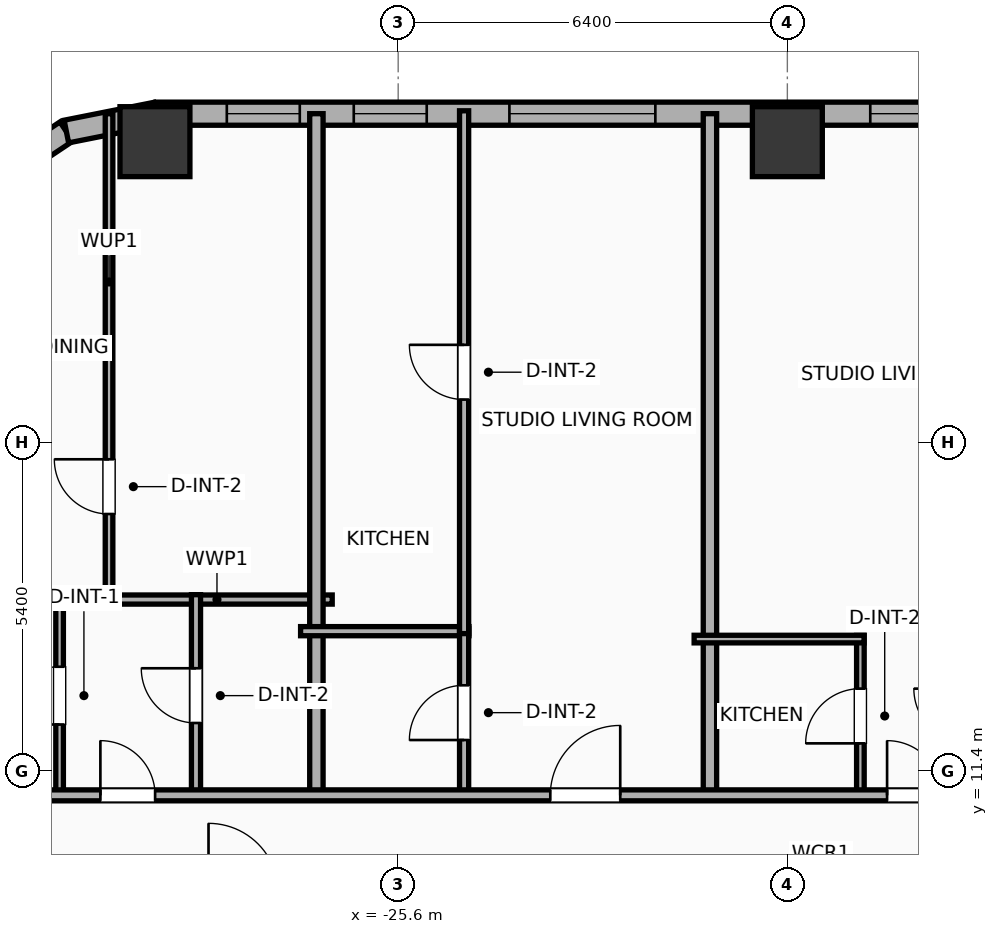
"""IFC4 building model, lengths in metres.
Left out: names, types, materials, properties, quantities, classifications, styles, units other than length and angle.
Written with IfcOpenShell. Run it as: python <this file> out.ifc"""

import sys

from ifc_helpers import new_model, si_unit, direction, frame, frame_2d, origin, origin_2d, place, context, subcontext, project, spatial, rectangle, hollow_rectangle, extrude, element, fill, save


model = new_model("IFC4")
c1 = context("Model", 3, precision=1e-05, world=origin(), true_north=direction((0.0, 1.0)))
c2 = subcontext(c1, "Body", "Model", "MODEL_VIEW")
j1 = project(units=[si_unit("LENGTHUNIT", "METRE"), si_unit("PLANEANGLEUNIT", "RADIAN")], contexts=[c1])
p1 = place(None, origin())
s1 = spatial("IfcSite", under=j1, at=p1, CompositionType="ELEMENT")
p2 = place(p1, origin())
s2 = spatial("IfcBuilding", under=s1, at=p2, CompositionType="ELEMENT")
p3 = place(p2, frame((0.0, 0.0, 65.0)))
s3 = spatial("IfcBuildingStorey", under=s2, at=p3, CompositionType="ELEMENT", Elevation=65.0)
for number, where, z_axis, x_axis in (
    (1, (-19.2, 21.75, 0.0), (0.0, 0.0, 1.0), (1.0, 0.0, 0.0)),
    (2, (-29.6, 21.75, 0.0), (0.0, 0.0, 1.0), (1.0, 0.0, 0.0)),
):
    element("IfcColumn", number, at=place(p3, frame(where, z_axis=z_axis, x_axis=x_axis)), inside=s3, PredefinedType="COLUMN", context=c2, shape_type="SweptSolid", body=[
        extrude(hollow_rectangle(XDim=1.15, YDim=1.15, WallThickness=0.04, at=origin_2d()), origin(), (0.0, 0.0, 1.0), 3.9),
    ])
p4 = place(p3, frame((-32.292, 21.091, 0.0), z_axis=(0.0, 0.0, 1.0), x_axis=(0.831442848281, 0.555610286119, 0.0)))
e3 = element("IfcWall", 3, at=p4, inside=s3, PredefinedType="ELEMENTEDWALL", context=c2, shape_type="SweptSolid", body=[
    extrude(rectangle(XDim=1.485, YDim=0.38, at=frame_2d((0.743, 0.0))), origin(), (0.0, 0.0, 1.0), 3.65),
])
p5 = place(p3, frame((-31.057, 21.917, 0.0), z_axis=(0.0, 0.0, 1.0), x_axis=(0.980786132421, 0.195086038585, 0.0)))
e4 = element("IfcWall", 4, at=p5, inside=s3, PredefinedType="ELEMENTEDWALL", context=c2, shape_type="SweptSolid", body=[
    extrude(rectangle(XDim=1.504, YDim=0.38, at=frame_2d((0.752, 0.0))), origin(), (0.0, 0.0, 1.0), 3.65),
])
p6 = place(p3, frame((-29.581, 22.21, 0.0), z_axis=(0.0, 0.0, 1.0), x_axis=(1.0, 0.0, 0.0)))
e5 = element("IfcWall", 5, at=p6, inside=s3, PredefinedType="ELEMENTEDWALL", context=c2, shape_type="SweptSolid", body=[
    extrude(rectangle(XDim=51.963, YDim=0.38, at=frame_2d((25.981, 0.0))), origin(), (0.0, 0.0, 1.0), 3.65),
])
p7 = place(p6, frame((5.81, 0.0, 0.75)))
e6 = element("IfcOpeningElement", 6, at=p7, cuts=e5, PredefinedType="OPENING", context=c2, shape_type="SweptSolid", body=[
    extrude(rectangle(XDim=2.4, YDim=2.1, at=frame_2d((1.2, 1.05))), frame((0.0, 0.2, 0.0), z_axis=(0.0, -1.0, 0.0), x_axis=(1.0, 0.0, 0.0)), (0.0, 0.0, 1.0), 0.4),
])
p8 = place(p6, frame((26.431, 0.0, 0.75)))
e7 = element("IfcOpeningElement", 7, at=p8, cuts=e5, PredefinedType="OPENING", context=c2, shape_type="SweptSolid", body=[
    extrude(rectangle(XDim=2.4, YDim=2.1, at=frame_2d((1.2, 1.05))), frame((0.0, 0.2, 0.0), z_axis=(0.0, -1.0, 0.0), x_axis=(1.0, 0.0, 0.0)), (0.0, 0.0, 1.0), 0.4),
])
p9 = place(p6, frame((43.752, 0.0, 0.75)))
e8 = element("IfcOpeningElement", 8, at=p9, cuts=e5, PredefinedType="OPENING", context=c2, shape_type="SweptSolid", body=[
    extrude(rectangle(XDim=2.4, YDim=2.1, at=frame_2d((1.2, 1.05))), frame((0.0, 0.2, 0.0), z_axis=(0.0, -1.0, 0.0), x_axis=(1.0, 0.0, 0.0)), (0.0, 0.0, 1.0), 0.4),
])
p10 = place(p6, frame((1.163, 0.0, 0.75)))
e9 = element("IfcOpeningElement", 9, at=p10, cuts=e5, PredefinedType="OPENING", context=c2, shape_type="SweptSolid", body=[
    extrude(rectangle(XDim=1.2, YDim=2.05, at=frame_2d((0.6, 1.025))), frame((0.0, 0.2, 0.0), z_axis=(0.0, -1.0, 0.0), x_axis=(1.0, 0.0, 0.0)), (0.0, 0.0, 1.0), 0.4),
])
p11 = place(p6, frame((3.251, 0.0, 0.75)))
e10 = element("IfcOpeningElement", 10, at=p11, cuts=e5, PredefinedType="OPENING", context=c2, shape_type="SweptSolid", body=[
    extrude(rectangle(XDim=1.2, YDim=2.05, at=frame_2d((0.6, 1.025))), frame((0.0, 0.2, 0.0), z_axis=(0.0, -1.0, 0.0), x_axis=(1.0, 0.0, 0.0)), (0.0, 0.0, 1.0), 0.4),
])
p12 = place(p6, frame((11.745, 0.0, 0.75)))
e11 = element("IfcOpeningElement", 11, at=p12, cuts=e5, PredefinedType="OPENING", context=c2, shape_type="SweptSolid", body=[
    extrude(rectangle(XDim=1.2, YDim=2.05, at=frame_2d((0.6, 1.025))), frame((0.0, 0.2, 0.0), z_axis=(0.0, -1.0, 0.0), x_axis=(1.0, 0.0, 0.0)), (0.0, 0.0, 1.0), 0.4),
])
p13 = place(p6, frame((16.776, 0.0, 0.75)))
e12 = element("IfcOpeningElement", 12, at=p13, cuts=e5, PredefinedType="OPENING", context=c2, shape_type="SweptSolid", body=[
    extrude(rectangle(XDim=1.2, YDim=2.05, at=frame_2d((0.6, 1.025))), frame((0.0, 0.2, 0.0), z_axis=(0.0, -1.0, 0.0), x_axis=(1.0, 0.0, 0.0)), (0.0, 0.0, 1.0), 0.4),
])
p14 = place(p6, frame((21.531, 0.0, 0.75)))
e13 = element("IfcOpeningElement", 13, at=p14, cuts=e5, PredefinedType="OPENING", context=c2, shape_type="SweptSolid", body=[
    extrude(rectangle(XDim=0.85, YDim=2.05, at=frame_2d((0.425, 1.025))), frame((0.0, 0.2, 0.0), z_axis=(0.0, -1.0, 0.0), x_axis=(1.0, 0.0, 0.0)), (0.0, 0.0, 1.0), 0.4),
])
p15 = place(p6, frame((23.776, 0.0, 0.75)))
e14 = element("IfcOpeningElement", 14, at=p15, cuts=e5, PredefinedType="OPENING", context=c2, shape_type="SweptSolid", body=[
    extrude(rectangle(XDim=1.2, YDim=2.05, at=frame_2d((0.6, 1.025))), frame((0.0, 0.2, 0.0), z_axis=(0.0, -1.0, 0.0), x_axis=(1.0, 0.0, 0.0)), (0.0, 0.0, 1.0), 0.4),
])
p16 = place(p6, frame((32.031, 0.0, 0.75)))
e15 = element("IfcOpeningElement", 15, at=p16, cuts=e5, PredefinedType="OPENING", context=c2, shape_type="SweptSolid", body=[
    extrude(rectangle(XDim=0.85, YDim=2.05, at=frame_2d((0.425, 1.025))), frame((0.0, 0.2, 0.0), z_axis=(0.0, -1.0, 0.0), x_axis=(1.0, 0.0, 0.0)), (0.0, 0.0, 1.0), 0.4),
])
p17 = place(p6, frame((34.276, 0.0, 0.75)))
e16 = element("IfcOpeningElement", 16, at=p17, cuts=e5, PredefinedType="OPENING", context=c2, shape_type="SweptSolid", body=[
    extrude(rectangle(XDim=1.2, YDim=2.05, at=frame_2d((0.6, 1.025))), frame((0.0, 0.2, 0.0), z_axis=(0.0, -1.0, 0.0), x_axis=(1.0, 0.0, 0.0)), (0.0, 0.0, 1.0), 0.4),
])
p18 = place(p6, frame((37.776, 0.0, 0.75)))
e17 = element("IfcOpeningElement", 17, at=p18, cuts=e5, PredefinedType="OPENING", context=c2, shape_type="SweptSolid", body=[
    extrude(rectangle(XDim=1.2, YDim=2.05, at=frame_2d((0.6, 1.025))), frame((0.0, 0.2, 0.0), z_axis=(0.0, -1.0, 0.0), x_axis=(1.0, 0.0, 0.0)), (0.0, 0.0, 1.0), 0.4),
])
p19 = place(p6, frame((42.411, 0.0, 0.75)))
e18 = element("IfcOpeningElement", 18, at=p19, cuts=e5, PredefinedType="OPENING", context=c2, shape_type="SweptSolid", body=[
    extrude(rectangle(XDim=0.85, YDim=2.05, at=frame_2d((0.425, 1.025))), frame((0.0, 0.2, 0.0), z_axis=(0.0, -1.0, 0.0), x_axis=(1.0, 0.0, 0.0)), (0.0, 0.0, 1.0), 0.4),
])
p20 = place(p6, frame((47.791, 0.0, 0.75)))
e19 = element("IfcOpeningElement", 19, at=p20, cuts=e5, PredefinedType="OPENING", context=c2, shape_type="SweptSolid", body=[
    extrude(rectangle(XDim=1.2, YDim=2.05, at=frame_2d((0.6, 1.025))), frame((0.0, 0.2, 0.0), z_axis=(0.0, -1.0, 0.0), x_axis=(1.0, 0.0, 0.0)), (0.0, 0.0, 1.0), 0.4),
])
p21 = place(p6, frame((49.901, 0.0, 0.75)))
e20 = element("IfcOpeningElement", 20, at=p21, cuts=e5, PredefinedType="OPENING", context=c2, shape_type="SweptSolid", body=[
    extrude(rectangle(XDim=1.2, YDim=2.05, at=frame_2d((0.6, 1.025))), frame((0.0, 0.2, 0.0), z_axis=(0.0, -1.0, 0.0), x_axis=(1.0, 0.0, 0.0)), (0.0, 0.0, 1.0), 0.4),
])
p22 = place(p3, frame((-30.355, 14.14, 0.0), z_axis=(0.0, 0.0, 1.0), x_axis=(0.0, 1.0, 0.0)))
e21 = element("IfcWall", 21, at=p22, inside=s3, PredefinedType="PARTITIONING", context=c2, shape_type="SweptSolid", body=[
    extrude(rectangle(XDim=8.069, YDim=0.125, at=frame_2d((4.035, 0.0))), origin(), (0.0, 0.0, 1.0), 3.65),
])
p23 = place(p22, frame((1.487, 0.0, 0.0)))
e22 = element("IfcOpeningElement", 22, at=p23, cuts=e21, PredefinedType="OPENING", context=c2, shape_type="SweptSolid", body=[
    extrude(rectangle(XDim=0.9, YDim=2.05, at=frame_2d((0.45, 1.025))), frame((0.0, 0.073, 0.0), z_axis=(0.0, -1.0, 0.0), x_axis=(1.0, 0.0, 0.0)), (0.0, 0.0, 1.0), 0.145),
])
p24 = place(p3, frame((-30.475, 14.22, 0.0), z_axis=(0.0, 0.0, 1.0), x_axis=(1.0, 0.0, 0.0)))
e23 = element("IfcWall", 23, at=p24, inside=s3, PredefinedType="PLUMBINGWALL", context=c2, shape_type="SweptSolid", body=[
    extrude(rectangle(XDim=3.79, YDim=0.15, at=frame_2d((1.895, 0.0))), origin(), (0.0, 0.0, 1.0), 3.65),
])
p25 = place(p3, frame((-31.168, 10.98, 0.0), z_axis=(0.0, 0.0, 1.0), x_axis=(0.0, 1.0, 0.0)))
e24 = element("IfcWall", 24, at=p25, inside=s3, PredefinedType="PARTITIONING", context=c2, shape_type="SweptSolid", body=[
    extrude(rectangle(XDim=3.32, YDim=0.125, at=frame_2d((1.66, 0.0))), origin(), (0.0, 0.0, 1.0), 3.65),
])
p26 = place(p25, frame((1.185, 0.0, 0.0)))
e25 = element("IfcOpeningElement", 25, at=p26, cuts=e24, PredefinedType="OPENING", context=c2, shape_type="SweptSolid", body=[
    extrude(rectangle(XDim=0.95, YDim=2.05, at=frame_2d((0.475, 1.025))), frame((0.0, 0.073, 0.0), z_axis=(0.0, -1.0, 0.0), x_axis=(1.0, 0.0, 0.0)), (0.0, 0.0, 1.0), 0.145),
])
p27 = place(p3, frame((-33.56, 14.22, 0.0), z_axis=(0.0, 0.0, 1.0), x_axis=(1.0, 0.0, 0.0)))
e26 = element("IfcWall", 26, at=p27, inside=s3, PredefinedType="PARTITIONING", context=c2, shape_type="SweptSolid", body=[
    extrude(rectangle(XDim=2.512, YDim=0.125, at=frame_2d((1.256, 0.0))), origin(), (0.0, 0.0, 1.0), 3.65),
])
p28 = place(p3, frame((-28.925, 10.98, 0.0), z_axis=(0.0, 0.0, 1.0), x_axis=(0.0, 1.0, 0.0)))
e27 = element("IfcWall", 27, at=p28, inside=s3, PredefinedType="PLUMBINGWALL", context=c2, shape_type="SweptSolid", body=[
    extrude(rectangle(XDim=3.32, YDim=0.15, at=frame_2d((1.66, 0.0))), origin(), (0.0, 0.0, 1.0), 3.65),
])
p29 = place(p28, frame((1.21, 0.0, 0.0)))
e28 = element("IfcOpeningElement", 28, at=p29, cuts=e27, PredefinedType="OPENING", context=c2, shape_type="SweptSolid", body=[
    extrude(rectangle(XDim=0.9, YDim=2.05, at=frame_2d((0.45, 1.025))), frame((0.0, 0.085, 0.0), z_axis=(0.0, -1.0, 0.0), x_axis=(1.0, 0.0, 0.0)), (0.0, 0.0, 1.0), 0.17),
])
p30 = place(p3, frame((-26.945, 10.92, 0.0), z_axis=(0.0, 0.0, 1.0), x_axis=(0.0, 1.0, 0.0)))
e29 = element("IfcWall", 29, at=p30, inside=s3, PredefinedType="PARTITIONING", context=c2, shape_type="SweptSolid", body=[
    extrude(rectangle(XDim=11.29, YDim=0.22, at=frame_2d((5.645, 0.0))), origin(), (0.0, 0.0, 1.0), 3.65),
])
p31 = place(p3, frame((-27.205, 13.7, 0.0), z_axis=(0.0, 0.0, 1.0), x_axis=(1.0, 0.0, 0.0)))
e30 = element("IfcWall", 30, at=p31, inside=s3, PredefinedType="PLUMBINGWALL", context=c2, shape_type="SweptSolid", body=[
    extrude(rectangle(XDim=2.769, YDim=0.15, at=frame_2d((1.385, 0.0))), origin(), (0.0, 0.0, 1.0), 3.65),
])
p32 = place(p3, frame((-24.516, 10.98, 0.0), z_axis=(0.0, 0.0, 1.0), x_axis=(0.0, 1.0, 0.0)))
e31 = element("IfcWall", 31, at=p32, inside=s3, PredefinedType="PLUMBINGWALL", context=c2, shape_type="SweptSolid", body=[
    extrude(rectangle(XDim=2.76, YDim=0.15, at=frame_2d((1.38, 0.0))), origin(), (0.0, 0.0, 1.0), 3.65),
])
p33 = place(p32, frame((0.93, 0.0, 0.0)))
e32 = element("IfcOpeningElement", 32, at=p33, cuts=e31, PredefinedType="OPENING", context=c2, shape_type="SweptSolid", body=[
    extrude(rectangle(XDim=0.9, YDim=2.05, at=frame_2d((0.45, 1.025))), frame((0.0, 0.085, 0.0), z_axis=(0.0, -1.0, 0.0), x_axis=(1.0, 0.0, 0.0)), (0.0, 0.0, 1.0), 0.17),
])
p34 = place(p3, frame((-24.516, 13.66, 0.0), z_axis=(0.0, 0.0, 1.0), x_axis=(0.0, 1.0, 0.0)))
e33 = element("IfcWall", 33, at=p34, inside=s3, PredefinedType="PLUMBINGWALL", context=c2, shape_type="SweptSolid", body=[
    extrude(rectangle(XDim=8.598, YDim=0.15, at=frame_2d((4.299, 0.0))), origin(), (0.0, 0.0, 1.0), 3.65),
])
p35 = place(p34, frame((3.849, 0.0, 0.0)))
e34 = element("IfcOpeningElement", 34, at=p35, cuts=e33, PredefinedType="OPENING", context=c2, shape_type="SweptSolid", body=[
    extrude(rectangle(XDim=0.9, YDim=2.05, at=frame_2d((0.45, 1.025))), frame((0.0, 0.085, 0.0), z_axis=(0.0, -1.0, 0.0), x_axis=(1.0, 0.0, 0.0)), (0.0, 0.0, 1.0), 0.17),
])
p36 = place(p3, frame((-20.473, 10.92, 0.0), z_axis=(0.0, 0.0, 1.0), x_axis=(0.0, 1.0, 0.0)))
e35 = element("IfcWall", 35, at=p36, inside=s3, PredefinedType="PARTITIONING", context=c2, shape_type="SweptSolid", body=[
    extrude(rectangle(XDim=11.29, YDim=0.22, at=frame_2d((5.645, 0.0))), origin(), (0.0, 0.0, 1.0), 3.65),
])
p37 = place(p3, frame((-17.999, 10.98, 0.0), z_axis=(0.0, 0.0, 1.0), x_axis=(0.0, 1.0, 0.0)))
e36 = element("IfcWall", 36, at=p37, inside=s3, PredefinedType="PARTITIONING", context=c2, shape_type="SweptSolid", body=[
    extrude(rectangle(XDim=2.65, YDim=0.125, at=frame_2d((1.325, 0.0))), origin(), (0.0, 0.0, 1.0), 3.65),
])
p38 = place(p37, frame((0.875, 0.0, 0.0)))
e37 = element("IfcOpeningElement", 37, at=p38, cuts=e36, PredefinedType="OPENING", context=c2, shape_type="SweptSolid", body=[
    extrude(rectangle(XDim=0.9, YDim=2.05, at=frame_2d((0.45, 1.025))), frame((0.0, 0.073, 0.0), z_axis=(0.0, -1.0, 0.0), x_axis=(1.0, 0.0, 0.0)), (0.0, 0.0, 1.0), 0.145),
])
p39 = place(p3, frame((-20.733, 13.57, 0.0), z_axis=(0.0, 0.0, 1.0), x_axis=(1.0, 0.0, 0.0)))
e38 = element("IfcWall", 38, at=p39, inside=s3, PredefinedType="PARTITIONING", context=c2, shape_type="SweptSolid", body=[
    extrude(rectangle(XDim=2.794, YDim=0.125, at=frame_2d((1.397, 0.0))), origin(), (0.0, 0.0, 1.0), 3.65),
])
p40 = place(p3, frame((-33.41, 11.0, 0.0), z_axis=(0.0, 0.0, 1.0), x_axis=(1.0, 0.0, 0.0)))
e39 = element("IfcWall", 39, at=p40, inside=s3, PredefinedType="PARTITIONING", context=c2, shape_type="SweptSolid", body=[
    extrude(rectangle(XDim=59.62, YDim=0.18, at=frame_2d((29.81, 0.0))), origin(), (0.0, 0.0, 1.0), 3.65),
])
p41 = place(p40, frame((2.913, 0.0, 0.0)))
e40 = element("IfcOpeningElement", 40, at=p41, cuts=e39, PredefinedType="OPENING", context=c2, shape_type="SweptSolid", body=[
    extrude(rectangle(XDim=0.9, YDim=2.05, at=frame_2d((0.45, 1.025))), frame((0.0, 0.1, 0.0), z_axis=(0.0, -1.0, 0.0), x_axis=(1.0, 0.0, 0.0)), (0.0, 0.0, 1.0), 0.2),
])
p42 = place(p40, frame((10.312, 0.0, 0.0)))
e41 = element("IfcOpeningElement", 41, at=p42, cuts=e39, PredefinedType="OPENING", context=c2, shape_type="SweptSolid", body=[
    extrude(rectangle(XDim=1.15, YDim=2.05, at=frame_2d((0.575, 1.025))), frame((0.0, 0.1, 0.0), z_axis=(0.0, -1.0, 0.0), x_axis=(1.0, 0.0, 0.0)), (0.0, 0.0, 1.0), 0.2),
])
p43 = place(p40, frame((15.85, 0.0, 0.0)))
e42 = element("IfcOpeningElement", 42, at=p43, cuts=e39, PredefinedType="OPENING", context=c2, shape_type="SweptSolid", body=[
    extrude(rectangle(XDim=0.9, YDim=2.05, at=frame_2d((0.45, 1.025))), frame((0.0, 0.1, 0.0), z_axis=(0.0, -1.0, 0.0), x_axis=(1.0, 0.0, 0.0)), (0.0, 0.0, 1.0), 0.2),
])
p44 = place(p40, frame((22.623, 0.0, 0.0)))
e43 = element("IfcOpeningElement", 43, at=p44, cuts=e39, PredefinedType="OPENING", context=c2, shape_type="SweptSolid", body=[
    extrude(rectangle(XDim=0.9, YDim=2.05, at=frame_2d((0.45, 1.025))), frame((0.0, 0.1, 0.0), z_axis=(0.0, -1.0, 0.0), x_axis=(1.0, 0.0, 0.0)), (0.0, 0.0, 1.0), 0.2),
])
p45 = place(p40, frame((29.622, 0.0, 0.0)))
e44 = element("IfcOpeningElement", 44, at=p45, cuts=e39, PredefinedType="OPENING", context=c2, shape_type="SweptSolid", body=[
    extrude(rectangle(XDim=0.9, YDim=2.05, at=frame_2d((0.45, 1.025))), frame((0.0, 0.1, 0.0), z_axis=(0.0, -1.0, 0.0), x_axis=(1.0, 0.0, 0.0)), (0.0, 0.0, 1.0), 0.2),
])
p46 = place(p40, frame((36.628, 0.0, 0.0)))
e45 = element("IfcOpeningElement", 45, at=p46, cuts=e39, PredefinedType="OPENING", context=c2, shape_type="SweptSolid", body=[
    extrude(rectangle(XDim=0.9, YDim=2.05, at=frame_2d((0.45, 1.025))), frame((0.0, 0.1, 0.0), z_axis=(0.0, -1.0, 0.0), x_axis=(1.0, 0.0, 0.0)), (0.0, 0.0, 1.0), 0.2),
])
p47 = place(p40, frame((43.627, 0.0, 0.0)))
e46 = element("IfcOpeningElement", 46, at=p47, cuts=e39, PredefinedType="OPENING", context=c2, shape_type="SweptSolid", body=[
    extrude(rectangle(XDim=0.9, YDim=2.05, at=frame_2d((0.45, 1.025))), frame((0.0, 0.1, 0.0), z_axis=(0.0, -1.0, 0.0), x_axis=(1.0, 0.0, 0.0)), (0.0, 0.0, 1.0), 0.2),
])
p48 = place(p40, frame((48.617, 0.0, 0.0)))
e47 = element("IfcOpeningElement", 47, at=p48, cuts=e39, PredefinedType="OPENING", context=c2, shape_type="SweptSolid", body=[
    extrude(rectangle(XDim=1.15, YDim=2.05, at=frame_2d((0.575, 1.025))), frame((0.0, 0.1, 0.0), z_axis=(0.0, -1.0, 0.0), x_axis=(1.0, 0.0, 0.0)), (0.0, 0.0, 1.0), 0.2),
])
p49 = place(p40, frame((56.272, 0.0, 0.0)))
e48 = element("IfcOpeningElement", 48, at=p49, cuts=e39, PredefinedType="OPENING", context=c2, shape_type="SweptSolid", body=[
    extrude(rectangle(XDim=0.9, YDim=2.05, at=frame_2d((0.45, 1.025))), frame((0.0, 0.1, 0.0), z_axis=(0.0, -1.0, 0.0), x_axis=(1.0, 0.0, 0.0)), (0.0, 0.0, 1.0), 0.2),
])
p50 = place(p7, origin())
e49 = element("IfcWindow", 49, at=p50, inside=s3, PartitioningType="SINGLE_PANEL", PredefinedType="WINDOW", context=c2, shape_type="SweptSolid", body=[
    extrude(rectangle(XDim=2.4, YDim=2.1, at=frame_2d((1.2, 1.05))), frame((0.0, 0.03, 0.0), z_axis=(0.0, -1.0, 0.0), x_axis=(1.0, 0.0, 0.0)), (0.0, 0.0, 1.0), 0.06),
])
fill(e6, e49)
p51 = place(p10, origin())
e50 = element("IfcWindow", 50, at=p51, inside=s3, PartitioningType="SINGLE_PANEL", PredefinedType="WINDOW", context=c2, shape_type="SweptSolid", body=[
    extrude(rectangle(XDim=1.2, YDim=2.05, at=frame_2d((0.6, 1.025))), frame((0.0, 0.03, 0.0), z_axis=(0.0, -1.0, 0.0), x_axis=(1.0, 0.0, 0.0)), (0.0, 0.0, 1.0), 0.06),
])
fill(e9, e50)
p52 = place(p11, origin())
e51 = element("IfcWindow", 51, at=p52, inside=s3, PartitioningType="SINGLE_PANEL", PredefinedType="WINDOW", context=c2, shape_type="SweptSolid", body=[
    extrude(rectangle(XDim=1.2, YDim=2.05, at=frame_2d((0.6, 1.025))), frame((0.0, 0.03, 0.0), z_axis=(0.0, -1.0, 0.0), x_axis=(1.0, 0.0, 0.0)), (0.0, 0.0, 1.0), 0.06),
])
fill(e10, e51)
p53 = place(p12, origin())
e52 = element("IfcWindow", 52, at=p53, inside=s3, PartitioningType="SINGLE_PANEL", PredefinedType="WINDOW", context=c2, shape_type="SweptSolid", body=[
    extrude(rectangle(XDim=1.2, YDim=2.05, at=frame_2d((0.6, 1.025))), frame((0.0, 0.03, 0.0), z_axis=(0.0, -1.0, 0.0), x_axis=(1.0, 0.0, 0.0)), (0.0, 0.0, 1.0), 0.06),
])
fill(e11, e52)
p54 = place(p23, origin())
e53 = element("IfcDoor", 53, at=p54, inside=s3, OperationType="SINGLE_SWING_RIGHT", PredefinedType="DOOR", context=c2, shape_type="SweptSolid", body=[
    extrude(rectangle(XDim=0.9, YDim=2.05, at=frame_2d((0.45, 1.025))), frame((0.0, 0.025, 0.0), z_axis=(0.0, -1.0, 0.0), x_axis=(1.0, 0.0, 0.0)), (0.0, 0.0, 1.0), 0.05),
])
fill(e22, e53)
p55 = place(p26, origin())
e54 = element("IfcDoor", 54, at=p55, inside=s3, OperationType="SINGLE_SWING_LEFT", PredefinedType="DOOR", context=c2, shape_type="SweptSolid", body=[
    extrude(rectangle(XDim=0.95, YDim=2.05, at=frame_2d((0.475, 1.025))), frame((0.0, 0.025, 0.0), z_axis=(0.0, -1.0, 0.0), x_axis=(1.0, 0.0, 0.0)), (0.0, 0.0, 1.0), 0.05),
])
fill(e25, e54)
p56 = place(p29, origin())
e55 = element("IfcDoor", 55, at=p56, inside=s3, OperationType="SINGLE_SWING_RIGHT", PredefinedType="DOOR", context=c2, shape_type="SweptSolid", body=[
    extrude(rectangle(XDim=0.9, YDim=2.05, at=frame_2d((0.45, 1.025))), frame((0.0, 0.025, 0.0), z_axis=(0.0, -1.0, 0.0), x_axis=(1.0, 0.0, 0.0)), (0.0, 0.0, 1.0), 0.05),
])
fill(e28, e55)
p57 = place(p33, origin())
e56 = element("IfcDoor", 56, at=p57, inside=s3, OperationType="SINGLE_SWING_LEFT", PredefinedType="DOOR", context=c2, shape_type="SweptSolid", body=[
    extrude(rectangle(XDim=0.9, YDim=2.05, at=frame_2d((0.45, 1.025))), frame((0.0, 0.025, 0.0), z_axis=(0.0, -1.0, 0.0), x_axis=(1.0, 0.0, 0.0)), (0.0, 0.0, 1.0), 0.05),
])
fill(e32, e56)
p58 = place(p35, origin())
e57 = element("IfcDoor", 57, at=p58, inside=s3, OperationType="SINGLE_SWING_RIGHT", PredefinedType="DOOR", context=c2, shape_type="SweptSolid", body=[
    extrude(rectangle(XDim=0.9, YDim=2.05, at=frame_2d((0.45, 1.025))), frame((0.0, 0.025, 0.0), z_axis=(0.0, -1.0, 0.0), x_axis=(1.0, 0.0, 0.0)), (0.0, 0.0, 1.0), 0.05),
])
fill(e34, e57)
p59 = place(p38, origin())
e58 = element("IfcDoor", 58, at=p59, inside=s3, OperationType="SINGLE_SWING_LEFT", PredefinedType="DOOR", context=c2, shape_type="SweptSolid", body=[
    extrude(rectangle(XDim=0.9, YDim=2.05, at=frame_2d((0.45, 1.025))), frame((0.0, 0.025, 0.0), z_axis=(0.0, -1.0, 0.0), x_axis=(1.0, 0.0, 0.0)), (0.0, 0.0, 1.0), 0.05),
])
fill(e37, e58)
p60 = place(p41, origin())
e59 = element("IfcDoor", 59, at=p60, inside=s3, OperationType="SINGLE_SWING_LEFT", PredefinedType="DOOR", context=c2, shape_type="SweptSolid", body=[
    extrude(rectangle(XDim=0.9, YDim=2.05, at=frame_2d((0.45, 1.025))), frame((0.0, 0.025, 0.0), z_axis=(0.0, -1.0, 0.0), x_axis=(1.0, 0.0, 0.0)), (0.0, 0.0, 1.0), 0.05),
])
fill(e40, e59)
p61 = place(p42, origin())
e60 = element("IfcDoor", 60, at=p61, inside=s3, OperationType="SINGLE_SWING_RIGHT", PredefinedType="DOOR", context=c2, shape_type="SweptSolid", body=[
    extrude(rectangle(XDim=1.15, YDim=2.05, at=frame_2d((0.575, 1.025))), frame((0.0, 0.025, 0.0), z_axis=(0.0, -1.0, 0.0), x_axis=(1.0, 0.0, 0.0)), (0.0, 0.0, 1.0), 0.05),
])
fill(e41, e60)
p62 = place(p43, origin())
e61 = element("IfcDoor", 61, at=p62, inside=s3, OperationType="SINGLE_SWING_LEFT", PredefinedType="DOOR", context=c2, shape_type="SweptSolid", body=[
    extrude(rectangle(XDim=0.9, YDim=2.05, at=frame_2d((0.45, 1.025))), frame((0.0, 0.025, 0.0), z_axis=(0.0, -1.0, 0.0), x_axis=(1.0, 0.0, 0.0)), (0.0, 0.0, 1.0), 0.05),
])
fill(e42, e61)
save(model, sys.argv[1])
